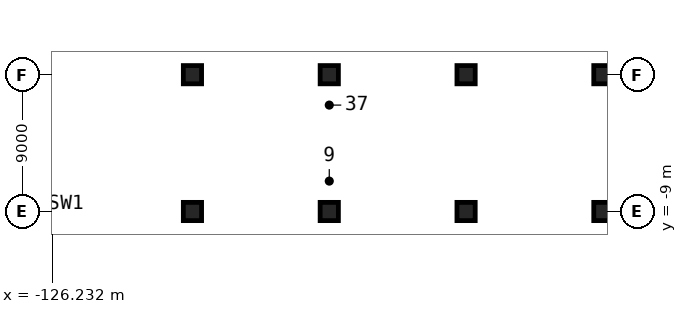
"""IFC4 building model, lengths in metres.
Left out: names, types, materials, properties, quantities, classifications, styles, units other than length and angle.
Written with IfcOpenShell. Run it as: python <this file> out.ifc"""

import sys

from ifc_helpers import new_model, si_unit, direction, frame, origin, origin_2d, place, context, subcontext, project, spatial, rectangle, extrude, element, save


model = new_model("IFC4")
c1 = context("Model", 3, precision=1e-05, world=origin(), true_north=direction((0.0, 1.0)))
c2 = subcontext(c1, "Body", "Model", "MODEL_VIEW")
j1 = project(units=[si_unit("LENGTHUNIT", "METRE"), si_unit("PLANEANGLEUNIT", "RADIAN")], contexts=[c1])
p1 = place(None, origin())
s1 = spatial("IfcSite", under=j1, at=p1, CompositionType="ELEMENT")
p2 = place(p1, origin())
s2 = spatial("IfcBuilding", under=s1, at=p2, CompositionType="ELEMENT")
p3 = place(p2, frame((0.0, 0.0, -9.0)))
s3 = spatial("IfcBuildingStorey", under=s2, at=p3, CompositionType="ELEMENT", Elevation=-9.0)
for number, where, z_axis, x_axis in (
    (1, (-117.0, -9.0, 0.0), (0.0, 0.0, 1.0), (1.0, 0.0, 0.0)),
    (2, (-117.0, 0.0, 0.0), (0.0, 0.0, 1.0), (1.0, 0.0, 0.0)),
    (3, (-108.0, -9.0, 0.0), (0.0, 0.0, 1.0), (1.0, 0.0, 0.0)),
    (4, (-108.0, 0.0, 0.0), (0.0, 0.0, 1.0), (1.0, 0.0, 0.0)),
    (5, (-99.0, -9.0, 0.0), (0.0, 0.0, 1.0), (1.0, 0.0, 0.0)),
    (6, (-99.0, 0.0, 0.0), (0.0, 0.0, 1.0), (1.0, 0.0, 0.0)),
    (7, (-90.0, -9.0, 0.0), (0.0, 0.0, 1.0), (1.0, 0.0, 0.0)),
    (8, (-90.0, 0.0, 0.0), (0.0, 0.0, 1.0), (1.0, 0.0, 0.0)),
):
    element("IfcColumn", number, at=place(p3, frame(where, z_axis=z_axis, x_axis=x_axis)), inside=s3, PredefinedType="COLUMN", context=c2, shape_type="SweptSolid", body=[
        extrude(rectangle(XDim=1.2, YDim=1.2, at=origin_2d()), origin(), (0.0, 0.0, 1.0), 4.5),
    ])
save(model, sys.argv[1])
